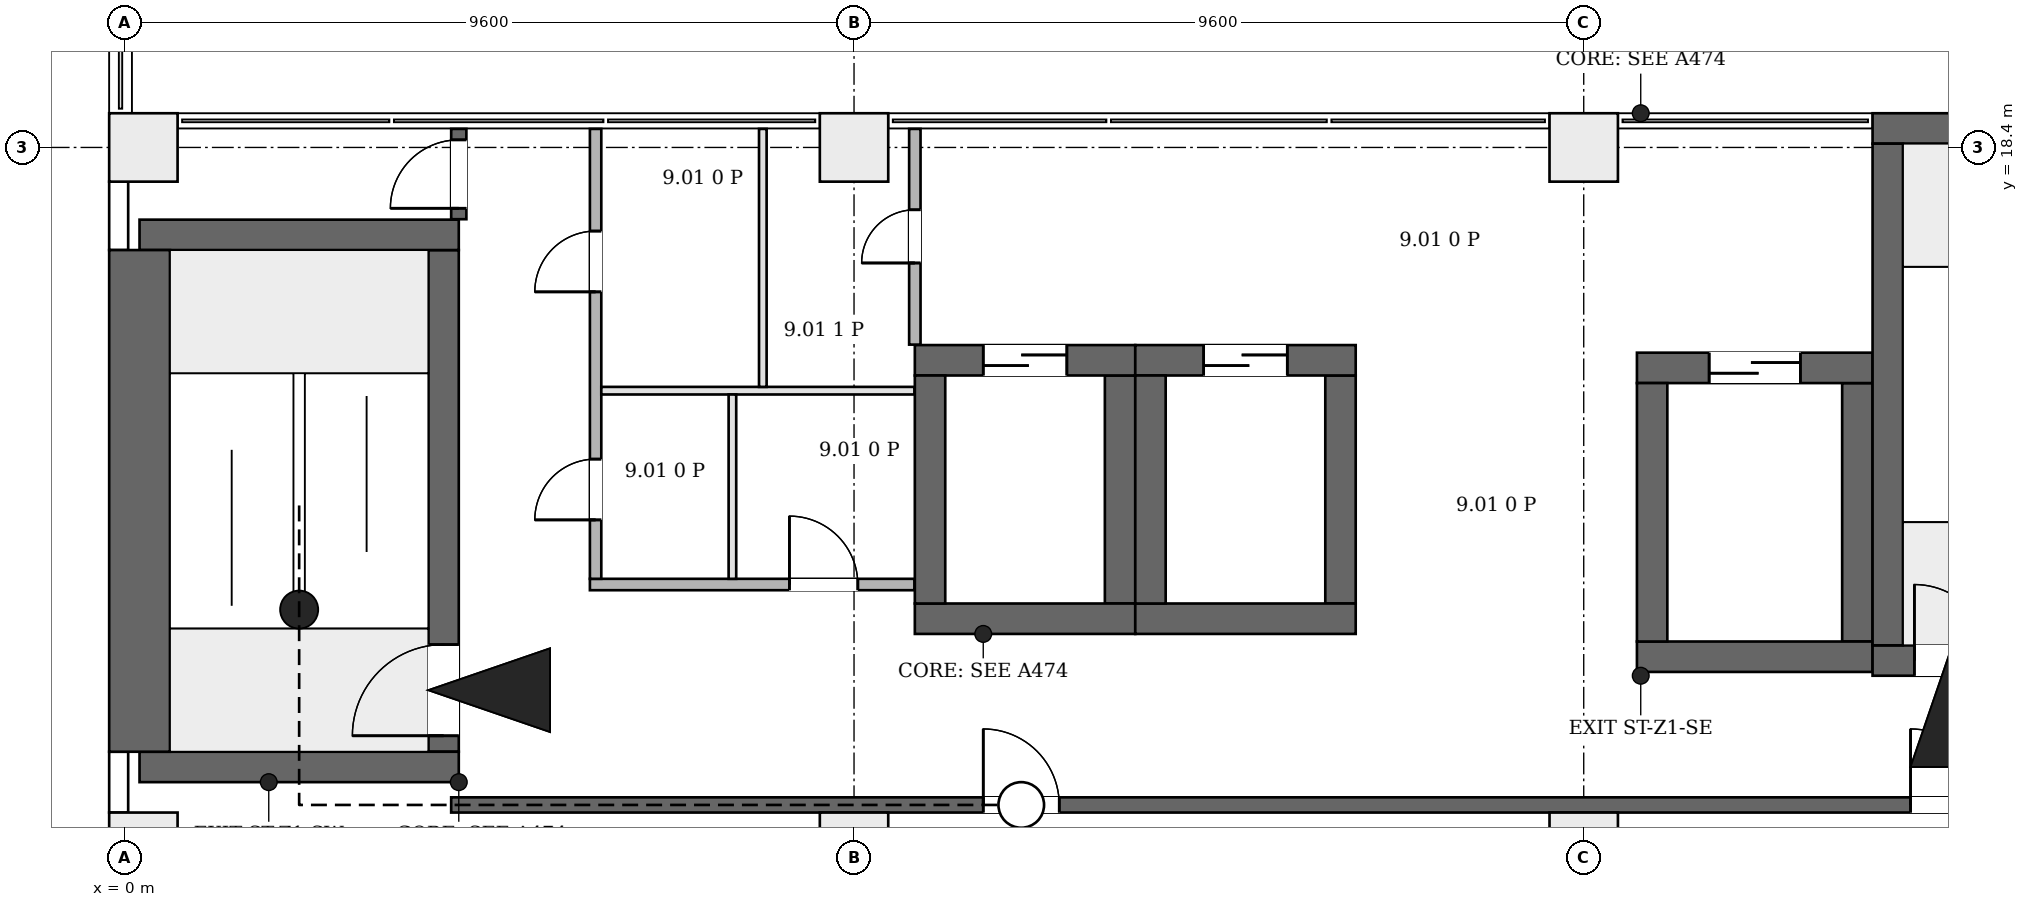
"""IFC4 building model, lengths in metres.
Left out: names, types, materials, properties, quantities, classifications, styles, units other than length and angle.
Written with IfcOpenShell. Run it as: python <this file> out.ifc"""

import sys

from ifc_helpers import new_model, si_unit, direction, frame, frame_2d, origin, origin_2d, place, context, subcontext, project, spatial, rectangle, extrude, element, fill, save


model = new_model("IFC4")
c1 = context("Model", 3, precision=1e-05, world=origin(), true_north=direction((0.0, 1.0)))
c2 = subcontext(c1, "Body", "Model", "MODEL_VIEW")
j1 = project(units=[si_unit("LENGTHUNIT", "METRE"), si_unit("PLANEANGLEUNIT", "RADIAN")], contexts=[c1])
p1 = place(None, origin())
s1 = spatial("IfcSite", under=j1, at=p1, CompositionType="ELEMENT")
p2 = place(p1, origin())
s2 = spatial("IfcBuilding", under=s1, at=p2, CompositionType="ELEMENT")
p3 = place(p2, frame((0.0, 0.0, 48.7)))
s3 = spatial("IfcBuildingStorey", under=s2, at=p3, CompositionType="ELEMENT", Elevation=48.7)
for number, where, z_axis, x_axis in (
    (1, (0.2, 10.25, 0.0), (0.0, 0.0, 1.0), (1.0, 0.0, 0.0)),
    (2, (0.2, 17.25, 0.0), (0.0, 0.0, 1.0), (1.0, 0.0, 0.0)),
):
    element("IfcWall", number, at=place(p3, frame(where, z_axis=z_axis, x_axis=x_axis)), inside=s3, PredefinedType="SHEAR", context=c2, shape_type="SweptSolid", body=[
        extrude(rectangle(XDim=4.2, YDim=0.4, at=frame_2d((2.1, 0.0))), origin(), (0.0, 0.0, 1.0), 4.2),
    ])
p4 = place(p3, frame((0.2, 10.45, 0.0), z_axis=(0.0, 0.0, 1.0), x_axis=(0.0, 1.0, 0.0)))
e3 = element("IfcWall", 3, at=p4, inside=s3, PredefinedType="SHEAR", context=c2, shape_type="SweptSolid", body=[
    extrude(rectangle(XDim=6.6, YDim=0.8, at=frame_2d((3.3, 0.0))), origin(), (0.0, 0.0, 1.0), 4.2),
])
p5 = place(p3, frame((4.2, 10.45, 0.0), z_axis=(0.0, 0.0, 1.0), x_axis=(0.0, 1.0, 0.0)))
e4 = element("IfcWall", 4, at=p5, inside=s3, PredefinedType="SHEAR", context=c2, shape_type="SweptSolid", body=[
    extrude(rectangle(XDim=6.6, YDim=0.4, at=frame_2d((3.3, 0.0))), origin(), (0.0, 0.0, 1.0), 4.2),
])
p6 = place(p5, frame((0.21, 0.0, 0.0)))
e5 = element("IfcOpeningElement", 5, at=p6, cuts=e4, PredefinedType="OPENING", context=c2, shape_type="SweptSolid", body=[
    extrude(rectangle(XDim=1.2, YDim=2.1, at=frame_2d((0.6, 1.05))), frame((0.0, 0.21, 0.0), z_axis=(0.0, -1.0, 0.0), x_axis=(1.0, 0.0, 0.0)), (0.0, 0.0, 1.0), 0.42),
])
p7 = place(p3, frame((23.0, 11.65, 0.0), z_axis=(0.0, 0.0, 1.0), x_axis=(1.0, 0.0, 0.0)))
e6 = element("IfcWall", 6, at=p7, inside=s3, PredefinedType="SHEAR", context=c2, shape_type="SweptSolid", body=[
    extrude(rectangle(XDim=4.2, YDim=0.4, at=frame_2d((2.1, 0.0))), origin(), (0.0, 0.0, 1.0), 4.2),
])
p8 = place(p7, frame((0.55, 0.0, 0.0)))
e7 = element("IfcOpeningElement", 7, at=p8, cuts=e6, PredefinedType="OPENING", context=c2, shape_type="SweptSolid", body=[
    extrude(rectangle(XDim=1.0, YDim=2.1, at=frame_2d((0.5, 1.05))), frame((0.0, 0.21, 0.0), z_axis=(0.0, -1.0, 0.0), x_axis=(1.0, 0.0, 0.0)), (0.0, 0.0, 1.0), 0.42),
])
p9 = place(p7, frame((2.65, 0.0, 0.0)))
e8 = element("IfcOpeningElement", 8, at=p9, cuts=e6, PredefinedType="OPENING", context=c2, shape_type="SweptSolid", body=[
    extrude(rectangle(XDim=1.0, YDim=2.1, at=frame_2d((0.5, 1.05))), frame((0.0, 0.21, 0.0), z_axis=(0.0, -1.0, 0.0), x_axis=(1.0, 0.0, 0.0)), (0.0, 0.0, 1.0), 0.42),
])
p10 = place(p3, frame((23.0, 18.65, 0.0), z_axis=(0.0, 0.0, 1.0), x_axis=(1.0, 0.0, 0.0)))
e9 = element("IfcWall", 9, at=p10, inside=s3, PredefinedType="SHEAR", context=c2, shape_type="SweptSolid", body=[
    extrude(rectangle(XDim=4.2, YDim=0.4, at=frame_2d((2.1, 0.0))), origin(), (0.0, 0.0, 1.0), 4.2),
])
p11 = place(p3, frame((23.2, 11.85, 0.0), z_axis=(0.0, 0.0, 1.0), x_axis=(0.0, 1.0, 0.0)))
e10 = element("IfcWall", 10, at=p11, inside=s3, PredefinedType="SHEAR", context=c2, shape_type="SweptSolid", body=[
    extrude(rectangle(XDim=6.6, YDim=0.4, at=frame_2d((3.3, 0.0))), origin(), (0.0, 0.0, 1.0), 4.2),
])
p12 = place(p3, frame((10.4, 12.2, 0.0), z_axis=(0.0, 0.0, 1.0), x_axis=(1.0, 0.0, 0.0)))
e11 = element("IfcWall", 11, at=p12, inside=s3, PredefinedType="SHEAR", context=c2, shape_type="SweptSolid", body=[
    extrude(rectangle(XDim=2.9, YDim=0.4, at=frame_2d((1.45, 0.0))), origin(), (0.0, 0.0, 1.0), 4.2),
])
p13 = place(p3, frame((10.4, 15.6, 0.0), z_axis=(0.0, 0.0, 1.0), x_axis=(1.0, 0.0, 0.0)))
e12 = element("IfcWall", 12, at=p13, inside=s3, PredefinedType="SHEAR", context=c2, shape_type="SweptSolid", body=[
    extrude(rectangle(XDim=2.9, YDim=0.4, at=frame_2d((1.45, 0.0))), origin(), (0.0, 0.0, 1.0), 4.2),
])
p14 = place(p13, frame((0.9, 0.0, 0.0)))
e13 = element("IfcOpeningElement", 13, at=p14, cuts=e12, PredefinedType="OPENING", context=c2, shape_type="SweptSolid", body=[
    extrude(rectangle(XDim=1.1, YDim=2.1, at=frame_2d((0.55, 1.05))), frame((0.0, 0.21, 0.0), z_axis=(0.0, -1.0, 0.0), x_axis=(1.0, 0.0, 0.0)), (0.0, 0.0, 1.0), 0.42),
])
for number, where, z_axis, x_axis in (
    (14, (10.6, 12.4, 0.0), (0.0, 0.0, 1.0), (0.0, 1.0, 0.0)),
    (15, (13.1, 12.4, 0.0), (0.0, 0.0, 1.0), (0.0, 1.0, 0.0)),
):
    element("IfcWall", number, at=place(p3, frame(where, z_axis=z_axis, x_axis=x_axis)), inside=s3, PredefinedType="SHEAR", context=c2, shape_type="SweptSolid", body=[
        extrude(rectangle(XDim=3.0, YDim=0.4, at=frame_2d((1.5, 0.0))), origin(), (0.0, 0.0, 1.0), 4.2),
    ])
p15 = place(p3, frame((13.3, 12.2, 0.0), z_axis=(0.0, 0.0, 1.0), x_axis=(1.0, 0.0, 0.0)))
e16 = element("IfcWall", 16, at=p15, inside=s3, PredefinedType="SHEAR", context=c2, shape_type="SweptSolid", body=[
    extrude(rectangle(XDim=2.9, YDim=0.4, at=frame_2d((1.45, 0.0))), origin(), (0.0, 0.0, 1.0), 4.2),
])
p16 = place(p3, frame((13.3, 15.6, 0.0), z_axis=(0.0, 0.0, 1.0), x_axis=(1.0, 0.0, 0.0)))
e17 = element("IfcWall", 17, at=p16, inside=s3, PredefinedType="SHEAR", context=c2, shape_type="SweptSolid", body=[
    extrude(rectangle(XDim=2.9, YDim=0.4, at=frame_2d((1.45, 0.0))), origin(), (0.0, 0.0, 1.0), 4.2),
])
p17 = place(p16, frame((0.9, 0.0, 0.0)))
e18 = element("IfcOpeningElement", 18, at=p17, cuts=e17, PredefinedType="OPENING", context=c2, shape_type="SweptSolid", body=[
    extrude(rectangle(XDim=1.1, YDim=2.1, at=frame_2d((0.55, 1.05))), frame((0.0, 0.21, 0.0), z_axis=(0.0, -1.0, 0.0), x_axis=(1.0, 0.0, 0.0)), (0.0, 0.0, 1.0), 0.42),
])
for number, where, z_axis, x_axis in (
    (19, (13.5, 12.4, 0.0), (0.0, 0.0, 1.0), (0.0, 1.0, 0.0)),
    (20, (16.0, 12.4, 0.0), (0.0, 0.0, 1.0), (0.0, 1.0, 0.0)),
):
    element("IfcWall", number, at=place(p3, frame(where, z_axis=z_axis, x_axis=x_axis)), inside=s3, PredefinedType="SHEAR", context=c2, shape_type="SweptSolid", body=[
        extrude(rectangle(XDim=3.0, YDim=0.4, at=frame_2d((1.5, 0.0))), origin(), (0.0, 0.0, 1.0), 4.2),
    ])
p18 = place(p3, frame((19.9, 11.7, 0.0), z_axis=(0.0, 0.0, 1.0), x_axis=(1.0, 0.0, 0.0)))
e21 = element("IfcWall", 21, at=p18, inside=s3, PredefinedType="SHEAR", context=c2, shape_type="SweptSolid", body=[
    extrude(rectangle(XDim=3.1, YDim=0.4, at=frame_2d((1.55, 0.0))), origin(), (0.0, 0.0, 1.0), 4.2),
])
p19 = place(p3, frame((19.9, 15.5, 0.0), z_axis=(0.0, 0.0, 1.0), x_axis=(1.0, 0.0, 0.0)))
e22 = element("IfcWall", 22, at=p19, inside=s3, PredefinedType="SHEAR", context=c2, shape_type="SweptSolid", body=[
    extrude(rectangle(XDim=3.1, YDim=0.4, at=frame_2d((1.55, 0.0))), origin(), (0.0, 0.0, 1.0), 4.2),
])
p20 = place(p19, frame((0.95, 0.0, 0.0)))
e23 = element("IfcOpeningElement", 23, at=p20, cuts=e22, PredefinedType="OPENING", context=c2, shape_type="SweptSolid", body=[
    extrude(rectangle(XDim=1.2, YDim=2.1, at=frame_2d((0.6, 1.05))), frame((0.0, 0.21, 0.0), z_axis=(0.0, -1.0, 0.0), x_axis=(1.0, 0.0, 0.0)), (0.0, 0.0, 1.0), 0.42),
])
for number, where, z_axis, x_axis in (
    (24, (20.1, 11.9, 0.0), (0.0, 0.0, 1.0), (0.0, 1.0, 0.0)),
    (25, (22.8, 11.9, 0.0), (0.0, 0.0, 1.0), (0.0, 1.0, 0.0)),
):
    element("IfcWall", number, at=place(p3, frame(where, z_axis=z_axis, x_axis=x_axis)), inside=s3, PredefinedType="SHEAR", context=c2, shape_type="SweptSolid", body=[
        extrude(rectangle(XDim=3.4, YDim=0.4, at=frame_2d((1.7, 0.0))), origin(), (0.0, 0.0, 1.0), 4.2),
    ])
for number, where, z_axis, x_axis in (
    (26, (0.25, 9.2, 0.0), (0.0, 0.0, 1.0), (1.0, 0.0, 0.0)),
    (27, (9.6, 9.2, 0.0), (0.0, 0.0, 1.0), (1.0, 0.0, 0.0)),
    (28, (19.2, 9.2, 0.0), (0.0, 0.0, 1.0), (1.0, 0.0, 0.0)),
    (29, (0.25, 18.4, 0.0), (0.0, 0.0, 1.0), (1.0, 0.0, 0.0)),
    (30, (9.6, 18.4, 0.0), (0.0, 0.0, 1.0), (1.0, 0.0, 0.0)),
    (31, (19.2, 18.4, 0.0), (0.0, 0.0, 1.0), (1.0, 0.0, 0.0)),
):
    element("IfcColumn", number, at=place(p3, frame(where, z_axis=z_axis, x_axis=x_axis)), inside=s3, PredefinedType="COLUMN", context=c2, shape_type="SweptSolid", body=[
        extrude(rectangle(XDim=0.9, YDim=0.9, at=origin_2d()), origin(), (0.0, 0.0, 1.0), 4.2),
    ])
p21 = place(p3, frame((-0.074, 10.45, 0.0), z_axis=(0.0, 0.0, 1.0), x_axis=(0.0, -1.0, 0.0)))
e32 = element("IfcWall", 32, at=p21, inside=s3, PredefinedType="ELEMENTEDWALL", context=c2, shape_type="SweptSolid", body=[
    extrude(rectangle(XDim=0.8, YDim=0.25, at=frame_2d((0.4, 0.0))), origin(), (0.0, 0.0, 1.0), 3.9),
])
p22 = place(p3, frame((-0.074, 17.95, 0.0), z_axis=(0.0, 0.0, 1.0), x_axis=(0.0, -1.0, 0.0)))
e33 = element("IfcWall", 33, at=p22, inside=s3, PredefinedType="ELEMENTEDWALL", context=c2, shape_type="SweptSolid", body=[
    extrude(rectangle(XDim=0.9, YDim=0.25, at=frame_2d((0.45, 0.0))), origin(), (0.0, 0.0, 1.0), 3.9),
])
p23 = place(p3, frame((4.3, 9.75, 0.0), z_axis=(0.0, 0.0, 1.0), x_axis=(1.0, 0.0, 0.0)))
e34 = element("IfcWall", 34, at=p23, inside=s3, PredefinedType="PARTITIONING", context=c2, shape_type="SweptSolid", body=[
    extrude(rectangle(XDim=43.894, YDim=0.2, at=frame_2d((21.947, 0.0))), origin(), (0.0, 0.0, 1.0), 3.9),
])
p24 = place(p23, frame((7.0, 0.0, 0.0)))
e35 = element("IfcOpeningElement", 35, at=p24, cuts=e34, PredefinedType="OPENING", context=c2, shape_type="SweptSolid", body=[
    extrude(rectangle(XDim=1.0, YDim=2.1, at=frame_2d((0.5, 1.05))), frame((0.0, 0.11, 0.0), z_axis=(0.0, -1.0, 0.0), x_axis=(1.0, 0.0, 0.0)), (0.0, 0.0, 1.0), 0.22),
])
p25 = place(p23, frame((19.2, 0.0, 0.0)))
e36 = element("IfcOpeningElement", 36, at=p25, cuts=e34, PredefinedType="OPENING", context=c2, shape_type="SweptSolid", body=[
    extrude(rectangle(XDim=1.0, YDim=2.1, at=frame_2d((0.5, 1.05))), frame((0.0, 0.11, 0.0), z_axis=(0.0, -1.0, 0.0), x_axis=(1.0, 0.0, 0.0)), (0.0, 0.0, 1.0), 0.22),
])
p26 = place(p23, frame((30.95, 0.0, 0.0)))
e37 = element("IfcOpeningElement", 37, at=p26, cuts=e34, PredefinedType="OPENING", context=c2, shape_type="SweptSolid", body=[
    extrude(rectangle(XDim=1.5, YDim=2.1, at=frame_2d((0.75, 1.05))), frame((0.0, 0.11, 0.0), z_axis=(0.0, -1.0, 0.0), x_axis=(1.0, 0.0, 0.0)), (0.0, 0.0, 1.0), 0.22),
])
p27 = place(p23, frame((40.9, 0.0, 0.0)))
e38 = element("IfcOpeningElement", 38, at=p27, cuts=e34, PredefinedType="OPENING", context=c2, shape_type="SweptSolid", body=[
    extrude(rectangle(XDim=1.0, YDim=2.1, at=frame_2d((0.5, 1.05))), frame((0.0, 0.11, 0.0), z_axis=(0.0, -1.0, 0.0), x_axis=(1.0, 0.0, 0.0)), (0.0, 0.0, 1.0), 0.22),
])
p28 = place(p3, frame((4.4, 17.456, 0.0), z_axis=(0.0, 0.0, 1.0), x_axis=(0.0, 1.0, 0.0)))
e39 = element("IfcWall", 39, at=p28, inside=s3, PredefinedType="PARTITIONING", context=c2, shape_type="SweptSolid", body=[
    extrude(rectangle(XDim=1.188, YDim=0.2, at=frame_2d((0.594, 0.0))), origin(), (0.0, 0.0, 1.0), 3.9),
])
p29 = place(p28, frame((0.144, 0.0, 0.0)))
e40 = element("IfcOpeningElement", 40, at=p29, cuts=e39, PredefinedType="OPENING", context=c2, shape_type="SweptSolid", body=[
    extrude(rectangle(XDim=0.9, YDim=2.1, at=frame_2d((0.45, 1.05))), frame((0.0, 0.11, 0.0), z_axis=(0.0, -1.0, 0.0), x_axis=(1.0, 0.0, 0.0)), (0.0, 0.0, 1.0), 0.22),
])
p30 = place(p3, frame((6.125, 12.65, 0.0), z_axis=(0.0, 0.0, 1.0), x_axis=(1.0, 0.0, 0.0)))
e41 = element("IfcWall", 41, at=p30, inside=s3, PredefinedType="PARTITIONING", context=c2, shape_type="SweptSolid", body=[
    extrude(rectangle(XDim=4.269, YDim=0.15, at=frame_2d((2.135, 0.0))), origin(), (0.0, 0.0, 1.0), 3.9),
])
p31 = place(p30, frame((2.625, 0.0, 0.0)))
e42 = element("IfcOpeningElement", 42, at=p31, cuts=e41, PredefinedType="OPENING", context=c2, shape_type="SweptSolid", body=[
    extrude(rectangle(XDim=0.9, YDim=2.1, at=frame_2d((0.45, 1.05))), frame((0.0, 0.085, 0.0), z_axis=(0.0, -1.0, 0.0), x_axis=(1.0, 0.0, 0.0)), (0.0, 0.0, 1.0), 0.17),
])
p32 = place(p3, frame((6.2, 12.725, 0.0), z_axis=(0.0, 0.0, 1.0), x_axis=(0.0, 1.0, 0.0)))
e43 = element("IfcWall", 43, at=p32, inside=s3, PredefinedType="PARTITIONING", context=c2, shape_type="SweptSolid", body=[
    extrude(rectangle(XDim=5.919, YDim=0.15, at=frame_2d((2.959, 0.0))), origin(), (0.0, 0.0, 1.0), 3.9),
])
p33 = place(p32, frame((0.775, 0.0, 0.0)))
e44 = element("IfcOpeningElement", 44, at=p33, cuts=e43, PredefinedType="OPENING", context=c2, shape_type="SweptSolid", body=[
    extrude(rectangle(XDim=0.8, YDim=2.1, at=frame_2d((0.4, 1.05))), frame((0.0, 0.085, 0.0), z_axis=(0.0, -1.0, 0.0), x_axis=(1.0, 0.0, 0.0)), (0.0, 0.0, 1.0), 0.17),
])
p34 = place(p32, frame((3.775, 0.0, 0.0)))
e45 = element("IfcOpeningElement", 45, at=p34, cuts=e43, PredefinedType="OPENING", context=c2, shape_type="SweptSolid", body=[
    extrude(rectangle(XDim=0.8, YDim=2.1, at=frame_2d((0.4, 1.05))), frame((0.0, 0.085, 0.0), z_axis=(0.0, -1.0, 0.0), x_axis=(1.0, 0.0, 0.0)), (0.0, 0.0, 1.0), 0.17),
])
p35 = place(p3, frame((6.275, 15.2, 0.0), z_axis=(0.0, 0.0, 1.0), x_axis=(1.0, 0.0, 0.0)))
e46 = element("IfcWall", 46, at=p35, inside=s3, PredefinedType="PARTITIONING", context=c2, shape_type="SweptSolid", body=[
    extrude(rectangle(XDim=4.119, YDim=0.1, at=frame_2d((2.06, 0.0))), origin(), (0.0, 0.0, 1.0), 3.9),
])
p36 = place(p3, frame((8.0, 12.725, 0.0), z_axis=(0.0, 0.0, 1.0), x_axis=(0.0, 1.0, 0.0)))
e47 = element("IfcWall", 47, at=p36, inside=s3, PredefinedType="PARTITIONING", context=c2, shape_type="SweptSolid", body=[
    extrude(rectangle(XDim=2.425, YDim=0.1, at=frame_2d((1.212, 0.0))), origin(), (0.0, 0.0, 1.0), 3.9),
])
p37 = place(p3, frame((8.4, 15.25, 0.0), z_axis=(0.0, 0.0, 1.0), x_axis=(0.0, 1.0, 0.0)))
e48 = element("IfcWall", 48, at=p37, inside=s3, PredefinedType="PARTITIONING", context=c2, shape_type="SweptSolid", body=[
    extrude(rectangle(XDim=3.394, YDim=0.1, at=frame_2d((1.697, 0.0))), origin(), (0.0, 0.0, 1.0), 3.9),
])
p38 = place(p3, frame((10.4, 15.806, 0.0), z_axis=(0.0, 0.0, 1.0), x_axis=(0.0, 1.0, 0.0)))
e49 = element("IfcWall", 49, at=p38, inside=s3, PredefinedType="PARTITIONING", context=c2, shape_type="SweptSolid", body=[
    extrude(rectangle(XDim=2.838, YDim=0.15, at=frame_2d((1.419, 0.0))), origin(), (0.0, 0.0, 1.0), 3.9),
])
p39 = place(p38, frame((1.074, 0.0, 0.0)))
e50 = element("IfcOpeningElement", 50, at=p39, cuts=e49, PredefinedType="OPENING", context=c2, shape_type="SweptSolid", body=[
    extrude(rectangle(XDim=0.7, YDim=2.1, at=frame_2d((0.35, 1.05))), frame((0.0, 0.085, 0.0), z_axis=(0.0, -1.0, 0.0), x_axis=(1.0, 0.0, 0.0)), (0.0, 0.0, 1.0), 0.17),
])
p40 = place(p6, origin())
e51 = element("IfcDoor", 51, at=p40, inside=s3, OperationType="SINGLE_SWING_RIGHT", PredefinedType="DOOR", context=c2, shape_type="SweptSolid", body=[
    extrude(rectangle(XDim=1.2, YDim=2.1, at=frame_2d((0.6, 1.05))), frame((0.0, 0.025, 0.0), z_axis=(0.0, -1.0, 0.0), x_axis=(1.0, 0.0, 0.0)), (0.0, 0.0, 1.0), 0.05),
])
fill(e5, e51)
p41 = place(p8, origin())
e52 = element("IfcDoor", 52, at=p41, inside=s3, OperationType="SINGLE_SWING_RIGHT", PredefinedType="DOOR", context=c2, shape_type="SweptSolid", body=[
    extrude(rectangle(XDim=1.0, YDim=2.1, at=frame_2d((0.5, 1.05))), frame((0.0, 0.025, 0.0), z_axis=(0.0, -1.0, 0.0), x_axis=(1.0, 0.0, 0.0)), (0.0, 0.0, 1.0), 0.05),
])
fill(e7, e52)
p42 = place(p14, origin())
e53 = element("IfcDoor", 53, at=p42, inside=s3, OperationType="DOUBLE_DOOR_SLIDING", PredefinedType="DOOR", context=c2, shape_type="SweptSolid", body=[
    extrude(rectangle(XDim=1.1, YDim=2.1, at=frame_2d((0.55, 1.05))), frame((0.0, 0.025, 0.0), z_axis=(0.0, -1.0, 0.0), x_axis=(1.0, 0.0, 0.0)), (0.0, 0.0, 1.0), 0.05),
])
fill(e13, e53)
p43 = place(p17, origin())
e54 = element("IfcDoor", 54, at=p43, inside=s3, OperationType="DOUBLE_DOOR_SLIDING", PredefinedType="DOOR", context=c2, shape_type="SweptSolid", body=[
    extrude(rectangle(XDim=1.1, YDim=2.1, at=frame_2d((0.55, 1.05))), frame((0.0, 0.025, 0.0), z_axis=(0.0, -1.0, 0.0), x_axis=(1.0, 0.0, 0.0)), (0.0, 0.0, 1.0), 0.05),
])
fill(e18, e54)
p44 = place(p20, origin())
e55 = element("IfcDoor", 55, at=p44, inside=s3, OperationType="DOUBLE_DOOR_SLIDING", PredefinedType="DOOR", context=c2, shape_type="SweptSolid", body=[
    extrude(rectangle(XDim=1.2, YDim=2.1, at=frame_2d((0.6, 1.05))), frame((0.0, 0.025, 0.0), z_axis=(0.0, -1.0, 0.0), x_axis=(1.0, 0.0, 0.0)), (0.0, 0.0, 1.0), 0.05),
])
fill(e23, e55)
p45 = place(p29, origin())
e56 = element("IfcDoor", 56, at=p45, inside=s3, OperationType="SINGLE_SWING_LEFT", PredefinedType="DOOR", context=c2, shape_type="SweptSolid", body=[
    extrude(rectangle(XDim=0.9, YDim=2.1, at=frame_2d((0.45, 1.05))), frame((0.0, 0.025, 0.0), z_axis=(0.0, -1.0, 0.0), x_axis=(1.0, 0.0, 0.0)), (0.0, 0.0, 1.0), 0.05),
])
fill(e40, e56)
p46 = place(p33, origin())
e57 = element("IfcDoor", 57, at=p46, inside=s3, OperationType="SINGLE_SWING_LEFT", PredefinedType="DOOR", context=c2, shape_type="SweptSolid", body=[
    extrude(rectangle(XDim=0.8, YDim=2.1, at=frame_2d((0.4, 1.05))), frame((0.0, 0.025, 0.0), z_axis=(0.0, -1.0, 0.0), x_axis=(1.0, 0.0, 0.0)), (0.0, 0.0, 1.0), 0.05),
])
fill(e44, e57)
p47 = place(p31, origin())
e58 = element("IfcDoor", 58, at=p47, inside=s3, OperationType="SINGLE_SWING_RIGHT", PredefinedType="DOOR", context=c2, shape_type="SweptSolid", body=[
    extrude(rectangle(XDim=0.9, YDim=2.1, at=frame_2d((0.45, 1.05))), frame((0.0, 0.025, 0.0), z_axis=(0.0, -1.0, 0.0), x_axis=(1.0, 0.0, 0.0)), (0.0, 0.0, 1.0), 0.05),
])
fill(e42, e58)
p48 = place(p34, origin())
e59 = element("IfcDoor", 59, at=p48, inside=s3, OperationType="SINGLE_SWING_LEFT", PredefinedType="DOOR", context=c2, shape_type="SweptSolid", body=[
    extrude(rectangle(XDim=0.8, YDim=2.1, at=frame_2d((0.4, 1.05))), frame((0.0, 0.025, 0.0), z_axis=(0.0, -1.0, 0.0), x_axis=(1.0, 0.0, 0.0)), (0.0, 0.0, 1.0), 0.05),
])
fill(e45, e59)
p49 = place(p39, origin())
e60 = element("IfcDoor", 60, at=p49, inside=s3, OperationType="SINGLE_SWING_LEFT", PredefinedType="DOOR", context=c2, shape_type="SweptSolid", body=[
    extrude(rectangle(XDim=0.7, YDim=2.1, at=frame_2d((0.35, 1.05))), frame((0.0, 0.025, 0.0), z_axis=(0.0, -1.0, 0.0), x_axis=(1.0, 0.0, 0.0)), (0.0, 0.0, 1.0), 0.05),
])
fill(e50, e60)
p50 = place(p24, origin())
e61 = element("IfcDoor", 61, at=p50, inside=s3, OperationType="SINGLE_SWING_RIGHT", PredefinedType="DOOR", context=c2, shape_type="SweptSolid", body=[
    extrude(rectangle(XDim=1.0, YDim=2.1, at=frame_2d((0.5, 1.05))), frame((0.0, 0.025, 0.0), z_axis=(0.0, -1.0, 0.0), x_axis=(1.0, 0.0, 0.0)), (0.0, 0.0, 1.0), 0.05),
])
fill(e35, e61)
p51 = place(p25, origin())
e62 = element("IfcDoor", 62, at=p51, inside=s3, OperationType="SINGLE_SWING_RIGHT", PredefinedType="DOOR", context=c2, shape_type="SweptSolid", body=[
    extrude(rectangle(XDim=1.0, YDim=2.1, at=frame_2d((0.5, 1.05))), frame((0.0, 0.025, 0.0), z_axis=(0.0, -1.0, 0.0), x_axis=(1.0, 0.0, 0.0)), (0.0, 0.0, 1.0), 0.05),
])
fill(e36, e62)
save(model, sys.argv[1])
